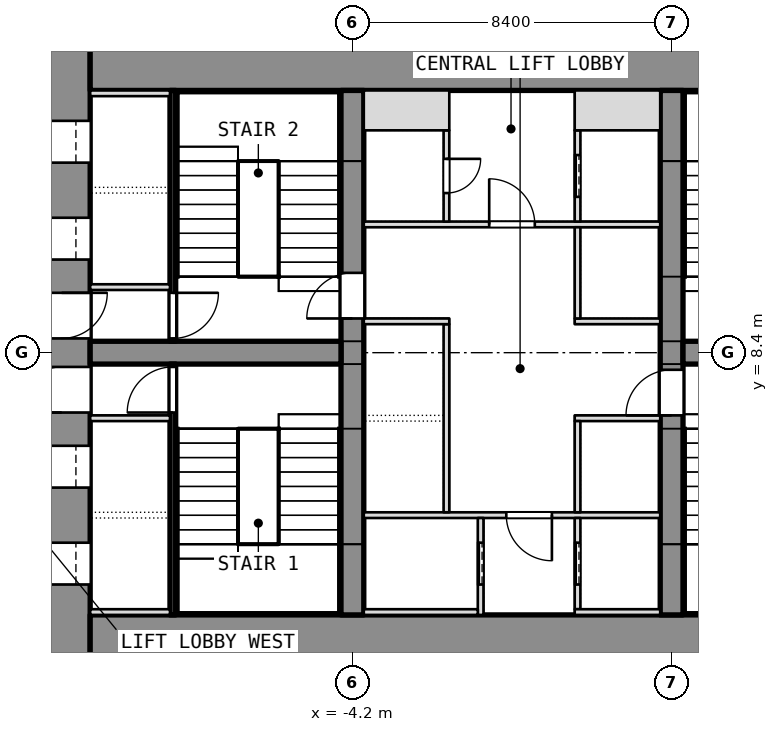
"""IFC4 building model, lengths in metres.
Left out: names, types, materials, properties, quantities, classifications, styles, units other than length and angle.
Written with IfcOpenShell. Run it as: python <this file> out.ifc"""

import sys

from ifc_helpers import new_model, si_unit, direction, frame, frame_2d, origin, place, context, subcontext, project, spatial, rectangle, extrude, element, fill, save


model = new_model("IFC4")
c1 = context("Model", 3, precision=1e-05, world=origin(), true_north=direction((0.0, 1.0)))
c2 = subcontext(c1, "Body", "Model", "MODEL_VIEW")
j1 = project(units=[si_unit("LENGTHUNIT", "METRE"), si_unit("PLANEANGLEUNIT", "RADIAN")], contexts=[c1])
p1 = place(None, origin())
s1 = spatial("IfcSite", under=j1, at=p1, CompositionType="ELEMENT")
p2 = place(p1, origin())
s2 = spatial("IfcBuilding", under=s1, at=p2, CompositionType="ELEMENT")
p3 = place(p2, frame((0.0, 0.0, 31.0)))
s3 = spatial("IfcBuildingStorey", under=s2, at=p3, CompositionType="ELEMENT", Elevation=31.0)
p4 = place(p3, frame((-11.85, 0.0, 0.0), z_axis=(0.0, 0.0, 1.0), x_axis=(0.0, 1.0, 0.0)))
e1 = element("IfcWall", 1, at=p4, inside=s3, PredefinedType="SHEAR", context=c2, shape_type="SweptSolid", body=[
    extrude(rectangle(XDim=16.8, YDim=1.5, at=frame_2d((8.4, 0.0))), origin(), (0.0, 0.0, 1.0), 5.5),
])
p5 = place(p4, frame((2.3, 0.0, 0.0)))
e2 = element("IfcOpeningElement", 2, at=p5, cuts=e1, PredefinedType="OPENING", context=c2, shape_type="SweptSolid", body=[
    extrude(rectangle(XDim=1.1, YDim=2.1, at=frame_2d((0.55, 1.05))), frame((0.0, 0.75, 0.0), z_axis=(0.0, -1.0, 0.0), x_axis=(1.0, 0.0, 0.0)), (0.0, 0.0, 1.0), 1.5),
])
p6 = place(p4, frame((4.85, 0.0, 0.0)))
e3 = element("IfcOpeningElement", 3, at=p6, cuts=e1, PredefinedType="OPENING", context=c2, shape_type="SweptSolid", body=[
    extrude(rectangle(XDim=1.1, YDim=2.1, at=frame_2d((0.55, 1.05))), frame((0.0, 0.75, 0.0), z_axis=(0.0, -1.0, 0.0), x_axis=(1.0, 0.0, 0.0)), (0.0, 0.0, 1.0), 1.5),
])
p7 = place(p4, frame((6.825, 0.0, 0.0)))
e4 = element("IfcOpeningElement", 4, at=p7, cuts=e1, PredefinedType="OPENING", context=c2, shape_type="SweptSolid", body=[
    extrude(rectangle(XDim=1.2, YDim=2.1, at=frame_2d((0.6, 1.05))), frame((0.0, 0.75, 0.0), z_axis=(0.0, -1.0, 0.0), x_axis=(1.0, 0.0, 0.0)), (0.0, 0.0, 1.0), 1.5),
])
p8 = place(p4, frame((13.4, 0.0, 0.0)))
e5 = element("IfcOpeningElement", 5, at=p8, cuts=e1, PredefinedType="OPENING", context=c2, shape_type="SweptSolid", body=[
    extrude(rectangle(XDim=1.1, YDim=2.1, at=frame_2d((0.55, 1.05))), frame((0.0, 0.75, 0.0), z_axis=(0.0, -1.0, 0.0), x_axis=(1.0, 0.0, 0.0)), (0.0, 0.0, 1.0), 1.5),
])
p9 = place(p4, frame((10.85, 0.0, 0.0)))
e6 = element("IfcOpeningElement", 6, at=p9, cuts=e1, PredefinedType="OPENING", context=c2, shape_type="SweptSolid", body=[
    extrude(rectangle(XDim=1.1, YDim=2.1, at=frame_2d((0.55, 1.05))), frame((0.0, 0.75, 0.0), z_axis=(0.0, -1.0, 0.0), x_axis=(1.0, 0.0, 0.0)), (0.0, 0.0, 1.0), 1.5),
])
p10 = place(p4, frame((8.775, 0.0, 0.0)))
e7 = element("IfcOpeningElement", 7, at=p10, cuts=e1, PredefinedType="OPENING", context=c2, shape_type="SweptSolid", body=[
    extrude(rectangle(XDim=1.2, YDim=2.1, at=frame_2d((0.6, 1.05))), frame((0.0, 0.75, 0.0), z_axis=(0.0, -1.0, 0.0), x_axis=(1.0, 0.0, 0.0)), (0.0, 0.0, 1.0), 1.5),
])
for number, where, z_axis, x_axis in (
    (8, (-11.1, 0.75, 0.0), (0.0, 0.0, 1.0), (1.0, 0.0, 0.0)),
    (9, (-11.1, 16.05, 0.0), (0.0, 0.0, 1.0), (1.0, 0.0, 0.0)),
):
    element("IfcWall", number, at=place(p3, frame(where, z_axis=z_axis, x_axis=x_axis)), inside=s3, PredefinedType="SHEAR", context=c2, shape_type="SweptSolid", body=[
        extrude(rectangle(XDim=22.2, YDim=1.5, at=frame_2d((11.1, 0.0))), origin(), (0.0, 0.0, 1.0), 5.5),
    ])
p11 = place(p3, frame((-4.2, 1.5, 0.0), z_axis=(0.0, 0.0, 1.0), x_axis=(0.0, 1.0, 0.0)))
e10 = element("IfcWall", 10, at=p11, inside=s3, PredefinedType="SHEAR", context=c2, shape_type="SweptSolid", body=[
    extrude(rectangle(XDim=13.8, YDim=0.6, at=frame_2d((6.9, 0.0))), origin(), (0.0, 0.0, 1.0), 5.5),
])
p12 = place(p11, frame((7.8, 0.0, 0.0)))
e11 = element("IfcOpeningElement", 11, at=p12, cuts=e10, PredefinedType="OPENING", context=c2, shape_type="SweptSolid", body=[
    extrude(rectangle(XDim=1.2, YDim=2.1, at=frame_2d((0.6, 1.05))), frame((0.0, 0.3, 0.0), z_axis=(0.0, -1.0, 0.0), x_axis=(1.0, 0.0, 0.0)), (0.0, 0.0, 1.0), 0.6),
])
p13 = place(p3, frame((4.2, 1.5, 0.0), z_axis=(0.0, 0.0, 1.0), x_axis=(0.0, 1.0, 0.0)))
e12 = element("IfcWall", 12, at=p13, inside=s3, PredefinedType="SHEAR", context=c2, shape_type="SweptSolid", body=[
    extrude(rectangle(XDim=13.8, YDim=0.6, at=frame_2d((6.9, 0.0))), origin(), (0.0, 0.0, 1.0), 5.5),
])
p14 = place(p13, frame((5.25, 0.0, 0.0)))
e13 = element("IfcOpeningElement", 13, at=p14, cuts=e12, PredefinedType="OPENING", context=c2, shape_type="SweptSolid", body=[
    extrude(rectangle(XDim=1.2, YDim=2.1, at=frame_2d((0.6, 1.05))), frame((0.0, 0.3, 0.0), z_axis=(0.0, -1.0, 0.0), x_axis=(1.0, 0.0, 0.0)), (0.0, 0.0, 1.0), 0.6),
])
for number, where, z_axis, x_axis in (
    (14, (-11.1, 8.4, 0.0), (0.0, 0.0, 1.0), (1.0, 0.0, 0.0)),
    (15, (4.5, 8.4, 0.0), (0.0, 0.0, 1.0), (1.0, 0.0, 0.0)),
):
    element("IfcWall", number, at=place(p3, frame(where, z_axis=z_axis, x_axis=x_axis)), inside=s3, PredefinedType="SHEAR", context=c2, shape_type="SweptSolid", body=[
        extrude(rectangle(XDim=6.6, YDim=0.6, at=frame_2d((3.3, 0.0))), origin(), (0.0, 0.0, 1.0), 5.5),
    ])
p15 = place(p3, frame((-8.925, 1.5, 0.0), z_axis=(0.0, 0.0, 1.0), x_axis=(0.0, 1.0, 0.0)))
e16 = element("IfcWall", 16, at=p15, inside=s3, PredefinedType="SHEAR", context=c2, shape_type="SweptSolid", body=[
    extrude(rectangle(XDim=6.6, YDim=0.15, at=frame_2d((3.3, 0.0))), origin(), (0.0, 0.0, 1.0), 5.35),
])
p16 = place(p15, frame((5.325, 0.0, 0.0)))
e17 = element("IfcOpeningElement", 17, at=p16, cuts=e16, PredefinedType="OPENING", context=c2, shape_type="SweptSolid", body=[
    extrude(rectangle(XDim=1.2, YDim=2.1, at=frame_2d((0.6, 1.05))), frame((0.0, 0.075, 0.0), z_axis=(0.0, -1.0, 0.0), x_axis=(1.0, 0.0, 0.0)), (0.0, 0.0, 1.0), 0.15),
])
for number, where, z_axis, x_axis in (
    (18, (-11.1, 6.675, 0.0), (0.0, 0.0, 1.0), (1.0, 0.0, 0.0)),
    (19, (-11.1, 1.575, 0.0), (0.0, 0.0, 1.0), (1.0, 0.0, 0.0)),
):
    element("IfcWall", number, at=place(p3, frame(where, z_axis=z_axis, x_axis=x_axis)), inside=s3, PredefinedType="SHEAR", context=c2, shape_type="SweptSolid", body=[
        extrude(rectangle(XDim=2.1, YDim=0.15, at=frame_2d((1.05, 0.0))), origin(), (0.0, 0.0, 1.0), 5.5),
    ])
p17 = place(p3, frame((-8.925, 8.7, 0.0), z_axis=(0.0, 0.0, 1.0), x_axis=(0.0, 1.0, 0.0)))
e20 = element("IfcWall", 20, at=p17, inside=s3, PredefinedType="SHEAR", context=c2, shape_type="SweptSolid", body=[
    extrude(rectangle(XDim=6.6, YDim=0.15, at=frame_2d((3.3, 0.0))), origin(), (0.0, 0.0, 1.0), 5.35),
])
p18 = place(p17, frame((0.075, 0.0, 0.0)))
e21 = element("IfcOpeningElement", 21, at=p18, cuts=e20, PredefinedType="OPENING", context=c2, shape_type="SweptSolid", body=[
    extrude(rectangle(XDim=1.2, YDim=2.1, at=frame_2d((0.6, 1.05))), frame((0.0, 0.075, 0.0), z_axis=(0.0, -1.0, 0.0), x_axis=(1.0, 0.0, 0.0)), (0.0, 0.0, 1.0), 0.15),
])
for number, where, z_axis, x_axis in (
    (22, (-11.1, 10.125, 0.0), (0.0, 0.0, 1.0), (1.0, 0.0, 0.0)),
    (23, (-11.1, 15.225, 0.0), (0.0, 0.0, 1.0), (1.0, 0.0, 0.0)),
):
    element("IfcWall", number, at=place(p3, frame(where, z_axis=z_axis, x_axis=x_axis)), inside=s3, PredefinedType="SHEAR", context=c2, shape_type="SweptSolid", body=[
        extrude(rectangle(XDim=2.1, YDim=0.15, at=frame_2d((1.05, 0.0))), origin(), (0.0, 0.0, 1.0), 5.5),
    ])
p19 = place(p3, frame((-3.9, 4.125, 0.0), z_axis=(0.0, 0.0, 1.0), x_axis=(1.0, 0.0, 0.0)))
e24 = element("IfcWall", 24, at=p19, inside=s3, PredefinedType="PARTITIONING", context=c2, shape_type="SweptSolid", body=[
    extrude(rectangle(XDim=7.8, YDim=0.15, at=frame_2d((3.9, 0.0))), origin(), (0.0, 0.0, 1.0), 5.35),
])
p20 = place(p19, frame((3.75, 0.0, 0.0)))
e25 = element("IfcOpeningElement", 25, at=p20, cuts=e24, PredefinedType="OPENING", context=c2, shape_type="SweptSolid", body=[
    extrude(rectangle(XDim=1.2, YDim=2.1, at=frame_2d((0.6, 1.05))), frame((0.0, 0.075, 0.0), z_axis=(0.0, -1.0, 0.0), x_axis=(1.0, 0.0, 0.0)), (0.0, 0.0, 1.0), 0.15),
])
p21 = place(p3, frame((-3.9, 11.775, 0.0), z_axis=(0.0, 0.0, 1.0), x_axis=(1.0, 0.0, 0.0)))
e26 = element("IfcWall", 26, at=p21, inside=s3, PredefinedType="PARTITIONING", context=c2, shape_type="SweptSolid", body=[
    extrude(rectangle(XDim=7.8, YDim=0.15, at=frame_2d((3.9, 0.0))), origin(), (0.0, 0.0, 1.0), 5.35),
])
p22 = place(p21, frame((3.3, 0.0, 0.0)))
e27 = element("IfcOpeningElement", 27, at=p22, cuts=e26, PredefinedType="OPENING", context=c2, shape_type="SweptSolid", body=[
    extrude(rectangle(XDim=1.2, YDim=2.1, at=frame_2d((0.6, 1.05))), frame((0.0, 0.075, 0.0), z_axis=(0.0, -1.0, 0.0), x_axis=(1.0, 0.0, 0.0)), (0.0, 0.0, 1.0), 0.15),
])
p23 = place(p3, frame((-0.825, 1.5, 0.0), z_axis=(0.0, 0.0, 1.0), x_axis=(0.0, 1.0, 0.0)))
e28 = element("IfcWall", 28, at=p23, inside=s3, PredefinedType="SHEAR", context=c2, shape_type="SweptSolid", body=[
    extrude(rectangle(XDim=2.55, YDim=0.15, at=frame_2d((1.275, 0.0))), origin(), (0.0, 0.0, 1.0), 5.5),
])
p24 = place(p23, frame((0.8, 0.0, 0.0)))
e29 = element("IfcOpeningElement", 29, at=p24, cuts=e28, PredefinedType="OPENING", context=c2, shape_type="SweptSolid", body=[
    extrude(rectangle(XDim=1.1, YDim=2.1, at=frame_2d((0.55, 1.05))), frame((0.0, 0.075, 0.0), z_axis=(0.0, -1.0, 0.0), x_axis=(1.0, 0.0, 0.0)), (0.0, 0.0, 1.0), 0.15),
])
p25 = place(p3, frame((-3.9, 1.575, 0.0), z_axis=(0.0, 0.0, 1.0), x_axis=(1.0, 0.0, 0.0)))
e30 = element("IfcWall", 30, at=p25, inside=s3, PredefinedType="SHEAR", context=c2, shape_type="SweptSolid", body=[
    extrude(rectangle(XDim=3.0, YDim=0.15, at=frame_2d((1.5, 0.0))), origin(), (0.0, 0.0, 1.0), 5.5),
])
p26 = place(p3, frame((-1.725, 4.2, 0.0), z_axis=(0.0, 0.0, 1.0), x_axis=(0.0, 1.0, 0.0)))
e31 = element("IfcWall", 31, at=p26, inside=s3, PredefinedType="SHEAR", context=c2, shape_type="SweptSolid", body=[
    extrude(rectangle(XDim=4.95, YDim=0.15, at=frame_2d((2.475, 0.0))), origin(), (0.0, 0.0, 1.0), 5.5),
])
p27 = place(p3, frame((-3.9, 9.225, 0.0), z_axis=(0.0, 0.0, 1.0), x_axis=(1.0, 0.0, 0.0)))
e32 = element("IfcWall", 32, at=p27, inside=s3, PredefinedType="SHEAR", context=c2, shape_type="SweptSolid", body=[
    extrude(rectangle(XDim=2.25, YDim=0.15, at=frame_2d((1.125, 0.0))), origin(), (0.0, 0.0, 1.0), 5.5),
])
p28 = place(p3, frame((-1.725, 11.85, 0.0), z_axis=(0.0, 0.0, 1.0), x_axis=(0.0, 1.0, 0.0)))
e33 = element("IfcWall", 33, at=p28, inside=s3, PredefinedType="PARTITIONING", context=c2, shape_type="SweptSolid", body=[
    extrude(rectangle(XDim=2.4, YDim=0.15, at=frame_2d((1.2, 0.0))), origin(), (0.0, 0.0, 1.0), 5.35),
])
p29 = place(p28, frame((0.75, 0.0, 0.0)))
e34 = element("IfcOpeningElement", 34, at=p29, cuts=e33, PredefinedType="OPENING", context=c2, shape_type="SweptSolid", body=[
    extrude(rectangle(XDim=0.9, YDim=2.1, at=frame_2d((0.45, 1.05))), frame((0.0, 0.075, 0.0), z_axis=(0.0, -1.0, 0.0), x_axis=(1.0, 0.0, 0.0)), (0.0, 0.0, 1.0), 0.15),
])
p30 = place(p3, frame((-3.9, 14.775, 0.0), z_axis=(0.0, 0.0, 1.0), x_axis=(1.0, 0.0, 0.0)))
e35 = element("IfcWall", 35, at=p30, inside=s3, PredefinedType="PARTITIONING", context=c2, shape_type="SweptSolid", body=[
    extrude(rectangle(XDim=2.25, YDim=1.05, at=frame_2d((1.125, 0.0))), origin(), (0.0, 0.0, 1.0), 5.35),
])
p31 = place(p3, frame((1.725, 1.65, 0.0), z_axis=(0.0, 0.0, 1.0), x_axis=(0.0, 1.0, 0.0)))
e36 = element("IfcWall", 36, at=p31, inside=s3, PredefinedType="SHEAR", context=c2, shape_type="SweptSolid", body=[
    extrude(rectangle(XDim=2.4, YDim=0.15, at=frame_2d((1.2, 0.0))), origin(), (0.0, 0.0, 1.0), 5.5),
])
p32 = place(p31, frame((0.65, 0.0, 0.0)))
e37 = element("IfcOpeningElement", 37, at=p32, cuts=e36, PredefinedType="OPENING", context=c2, shape_type="SweptSolid", body=[
    extrude(rectangle(XDim=1.1, YDim=2.1, at=frame_2d((0.55, 1.05))), frame((0.0, 0.075, 0.0), z_axis=(0.0, -1.0, 0.0), x_axis=(1.0, 0.0, 0.0)), (0.0, 0.0, 1.0), 0.15),
])
p33 = place(p3, frame((1.65, 1.575, 0.0), z_axis=(0.0, 0.0, 1.0), x_axis=(1.0, 0.0, 0.0)))
e38 = element("IfcWall", 38, at=p33, inside=s3, PredefinedType="SHEAR", context=c2, shape_type="SweptSolid", body=[
    extrude(rectangle(XDim=2.25, YDim=0.15, at=frame_2d((1.125, 0.0))), origin(), (0.0, 0.0, 1.0), 5.5),
])
p34 = place(p3, frame((1.725, 11.85, 0.0), z_axis=(0.0, 0.0, 1.0), x_axis=(0.0, 1.0, 0.0)))
e39 = element("IfcWall", 39, at=p34, inside=s3, PredefinedType="SHEAR", context=c2, shape_type="SweptSolid", body=[
    extrude(rectangle(XDim=2.4, YDim=0.15, at=frame_2d((1.2, 0.0))), origin(), (0.0, 0.0, 1.0), 5.5),
])
p35 = place(p34, frame((0.65, 0.0, 0.0)))
e40 = element("IfcOpeningElement", 40, at=p35, cuts=e39, PredefinedType="OPENING", context=c2, shape_type="SweptSolid", body=[
    extrude(rectangle(XDim=1.1, YDim=2.1, at=frame_2d((0.55, 1.05))), frame((0.0, 0.075, 0.0), z_axis=(0.0, -1.0, 0.0), x_axis=(1.0, 0.0, 0.0)), (0.0, 0.0, 1.0), 0.15),
])
p36 = place(p3, frame((1.65, 14.775, 0.0), z_axis=(0.0, 0.0, 1.0), x_axis=(1.0, 0.0, 0.0)))
e41 = element("IfcWall", 41, at=p36, inside=s3, PredefinedType="SHEAR", context=c2, shape_type="SweptSolid", body=[
    extrude(rectangle(XDim=2.25, YDim=1.05, at=frame_2d((1.125, 0.0))), origin(), (0.0, 0.0, 1.0), 5.5),
])
for number, where, z_axis, x_axis in (
    (42, (1.65, 6.675, 0.0), (0.0, 0.0, 1.0), (1.0, 0.0, 0.0)),
    (43, (1.65, 9.225, 0.0), (0.0, 0.0, 1.0), (1.0, 0.0, 0.0)),
):
    element("IfcWall", number, at=place(p3, frame(where, z_axis=z_axis, x_axis=x_axis)), inside=s3, PredefinedType="SHEAR", context=c2, shape_type="SweptSolid", body=[
        extrude(rectangle(XDim=2.25, YDim=0.15, at=frame_2d((1.125, 0.0))), origin(), (0.0, 0.0, 1.0), 5.5),
    ])
p37 = place(p3, frame((1.725, 4.2, 0.0), z_axis=(0.0, 0.0, 1.0), x_axis=(0.0, 1.0, 0.0)))
e44 = element("IfcWall", 44, at=p37, inside=s3, PredefinedType="SHEAR", context=c2, shape_type="SweptSolid", body=[
    extrude(rectangle(XDim=2.4, YDim=0.15, at=frame_2d((1.2, 0.0))), origin(), (0.0, 0.0, 1.0), 5.5),
])
p38 = place(p3, frame((1.725, 9.3, 0.0), z_axis=(0.0, 0.0, 1.0), x_axis=(0.0, 1.0, 0.0)))
e45 = element("IfcWall", 45, at=p38, inside=s3, PredefinedType="SHEAR", context=c2, shape_type="SweptSolid", body=[
    extrude(rectangle(XDim=2.4, YDim=0.15, at=frame_2d((1.2, 0.0))), origin(), (0.0, 0.0, 1.0), 5.5),
])
p39 = place(p5, origin())
e46 = element("IfcDoor", 46, at=p39, inside=s3, OperationType="SLIDING_TO_LEFT", PredefinedType="DOOR", context=c2, shape_type="SweptSolid", body=[
    extrude(rectangle(XDim=1.1, YDim=2.1, at=frame_2d((0.55, 1.05))), frame((0.0, 0.025, 0.0), z_axis=(0.0, -1.0, 0.0), x_axis=(1.0, 0.0, 0.0)), (0.0, 0.0, 1.0), 0.05),
])
fill(e2, e46)
p40 = place(p6, origin())
e47 = element("IfcDoor", 47, at=p40, inside=s3, OperationType="SLIDING_TO_LEFT", PredefinedType="DOOR", context=c2, shape_type="SweptSolid", body=[
    extrude(rectangle(XDim=1.1, YDim=2.1, at=frame_2d((0.55, 1.05))), frame((0.0, 0.025, 0.0), z_axis=(0.0, -1.0, 0.0), x_axis=(1.0, 0.0, 0.0)), (0.0, 0.0, 1.0), 0.05),
])
fill(e3, e47)
p41 = place(p7, origin())
e48 = element("IfcDoor", 48, at=p41, inside=s3, OperationType="SINGLE_SWING_LEFT", PredefinedType="DOOR", context=c2, shape_type="SweptSolid", body=[
    extrude(rectangle(XDim=1.2, YDim=2.1, at=frame_2d((0.6, 1.05))), frame((0.0, 0.025, 0.0), z_axis=(0.0, -1.0, 0.0), x_axis=(1.0, 0.0, 0.0)), (0.0, 0.0, 1.0), 0.05),
])
fill(e4, e48)
p42 = place(p16, origin())
e49 = element("IfcDoor", 49, at=p42, inside=s3, OperationType="SINGLE_SWING_LEFT", PredefinedType="DOOR", context=c2, shape_type="SweptSolid", body=[
    extrude(rectangle(XDim=1.2, YDim=2.1, at=frame_2d((0.6, 1.05))), frame((0.0, 0.025, 0.0), z_axis=(0.0, -1.0, 0.0), x_axis=(1.0, 0.0, 0.0)), (0.0, 0.0, 1.0), 0.05),
])
fill(e17, e49)
p43 = place(p8, origin())
e50 = element("IfcDoor", 50, at=p43, inside=s3, OperationType="SLIDING_TO_LEFT", PredefinedType="DOOR", context=c2, shape_type="SweptSolid", body=[
    extrude(rectangle(XDim=1.1, YDim=2.1, at=frame_2d((0.55, 1.05))), frame((0.0, 0.025, 0.0), z_axis=(0.0, -1.0, 0.0), x_axis=(1.0, 0.0, 0.0)), (0.0, 0.0, 1.0), 0.05),
])
fill(e5, e50)
p44 = place(p9, origin())
e51 = element("IfcDoor", 51, at=p44, inside=s3, OperationType="SLIDING_TO_LEFT", PredefinedType="DOOR", context=c2, shape_type="SweptSolid", body=[
    extrude(rectangle(XDim=1.1, YDim=2.1, at=frame_2d((0.55, 1.05))), frame((0.0, 0.025, 0.0), z_axis=(0.0, -1.0, 0.0), x_axis=(1.0, 0.0, 0.0)), (0.0, 0.0, 1.0), 0.05),
])
fill(e6, e51)
p45 = place(p10, origin())
e52 = element("IfcDoor", 52, at=p45, inside=s3, OperationType="SINGLE_SWING_LEFT", PredefinedType="DOOR", context=c2, shape_type="SweptSolid", body=[
    extrude(rectangle(XDim=1.2, YDim=2.1, at=frame_2d((0.6, 1.05))), frame((0.0, 0.025, 0.0), z_axis=(0.0, -1.0, 0.0), x_axis=(1.0, 0.0, 0.0)), (0.0, 0.0, 1.0), 0.05),
])
fill(e7, e52)
p46 = place(p18, origin())
e53 = element("IfcDoor", 53, at=p46, inside=s3, OperationType="SINGLE_SWING_LEFT", PredefinedType="DOOR", context=c2, shape_type="SweptSolid", body=[
    extrude(rectangle(XDim=1.2, YDim=2.1, at=frame_2d((0.6, 1.05))), frame((0.0, 0.025, 0.0), z_axis=(0.0, -1.0, 0.0), x_axis=(1.0, 0.0, 0.0)), (0.0, 0.0, 1.0), 0.05),
])
fill(e21, e53)
p47 = place(p24, origin())
e54 = element("IfcDoor", 54, at=p47, inside=s3, OperationType="SLIDING_TO_LEFT", PredefinedType="DOOR", context=c2, shape_type="SweptSolid", body=[
    extrude(rectangle(XDim=1.1, YDim=2.1, at=frame_2d((0.55, 1.05))), frame((0.0, 0.025, 0.0), z_axis=(0.0, -1.0, 0.0), x_axis=(1.0, 0.0, 0.0)), (0.0, 0.0, 1.0), 0.05),
])
fill(e29, e54)
p48 = place(p32, origin())
e55 = element("IfcDoor", 55, at=p48, inside=s3, OperationType="SLIDING_TO_LEFT", PredefinedType="DOOR", context=c2, shape_type="SweptSolid", body=[
    extrude(rectangle(XDim=1.1, YDim=2.1, at=frame_2d((0.55, 1.05))), frame((0.0, 0.025, 0.0), z_axis=(0.0, -1.0, 0.0), x_axis=(1.0, 0.0, 0.0)), (0.0, 0.0, 1.0), 0.05),
])
fill(e37, e55)
p49 = place(p35, origin())
e56 = element("IfcDoor", 56, at=p49, inside=s3, OperationType="SLIDING_TO_LEFT", PredefinedType="DOOR", context=c2, shape_type="SweptSolid", body=[
    extrude(rectangle(XDim=1.1, YDim=2.1, at=frame_2d((0.55, 1.05))), frame((0.0, 0.025, 0.0), z_axis=(0.0, -1.0, 0.0), x_axis=(1.0, 0.0, 0.0)), (0.0, 0.0, 1.0), 0.05),
])
fill(e40, e56)
p50 = place(p20, origin())
e57 = element("IfcDoor", 57, at=p50, inside=s3, OperationType="SINGLE_SWING_LEFT", PredefinedType="DOOR", context=c2, shape_type="SweptSolid", body=[
    extrude(rectangle(XDim=1.2, YDim=2.1, at=frame_2d((0.6, 1.05))), frame((0.0, 0.025, 0.0), z_axis=(0.0, -1.0, 0.0), x_axis=(1.0, 0.0, 0.0)), (0.0, 0.0, 1.0), 0.05),
])
fill(e25, e57)
p51 = place(p22, origin())
e58 = element("IfcDoor", 58, at=p51, inside=s3, OperationType="SINGLE_SWING_LEFT", PredefinedType="DOOR", context=c2, shape_type="SweptSolid", body=[
    extrude(rectangle(XDim=1.2, YDim=2.1, at=frame_2d((0.6, 1.05))), frame((0.0, 0.025, 0.0), z_axis=(0.0, -1.0, 0.0), x_axis=(1.0, 0.0, 0.0)), (0.0, 0.0, 1.0), 0.05),
])
fill(e27, e58)
p52 = place(p29, origin())
e59 = element("IfcDoor", 59, at=p52, inside=s3, OperationType="SINGLE_SWING_LEFT", PredefinedType="DOOR", context=c2, shape_type="SweptSolid", body=[
    extrude(rectangle(XDim=0.9, YDim=2.1, at=frame_2d((0.45, 1.05))), frame((0.0, 0.025, 0.0), z_axis=(0.0, -1.0, 0.0), x_axis=(1.0, 0.0, 0.0)), (0.0, 0.0, 1.0), 0.05),
])
fill(e34, e59)
p53 = place(p12, origin())
e60 = element("IfcDoor", 60, at=p53, inside=s3, OperationType="SINGLE_SWING_LEFT", PredefinedType="DOOR", context=c2, shape_type="SweptSolid", body=[
    extrude(rectangle(XDim=1.2, YDim=2.1, at=frame_2d((0.6, 1.05))), frame((0.0, 0.025, 0.0), z_axis=(0.0, -1.0, 0.0), x_axis=(1.0, 0.0, 0.0)), (0.0, 0.0, 1.0), 0.05),
])
fill(e11, e60)
p54 = place(p14, origin())
e61 = element("IfcDoor", 61, at=p54, inside=s3, OperationType="SINGLE_SWING_LEFT", PredefinedType="DOOR", context=c2, shape_type="SweptSolid", body=[
    extrude(rectangle(XDim=1.2, YDim=2.1, at=frame_2d((0.6, 1.05))), frame((0.0, 0.025, 0.0), z_axis=(0.0, -1.0, 0.0), x_axis=(1.0, 0.0, 0.0)), (0.0, 0.0, 1.0), 0.05),
])
fill(e13, e61)
save(model, sys.argv[1])
